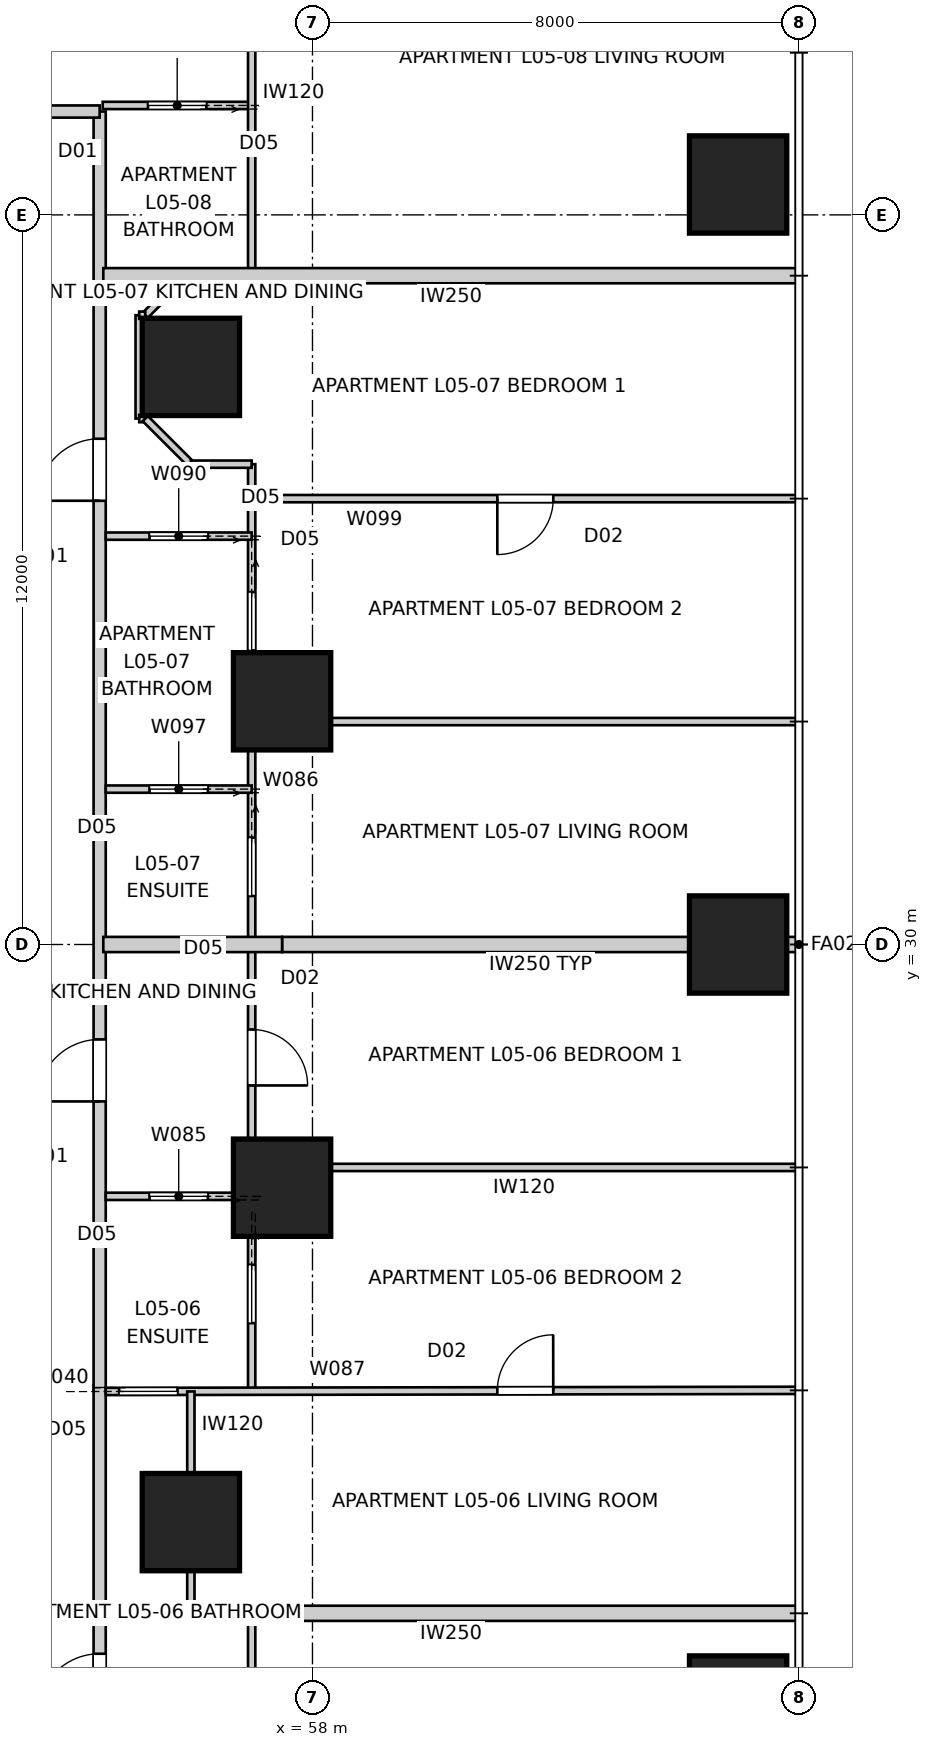
"""IFC4 building model, lengths in metres.
Left out: names, types, materials, properties, quantities, classifications, styles, units other than length and angle.
Written with IfcOpenShell. Run it as: python <this file> out.ifc"""

import sys

from ifc_helpers import new_model, si_unit, direction, frame, frame_2d, origin, origin_2d, place, context, subcontext, project, spatial, rectangle, extrude, element, fill, save


model = new_model("IFC4")
c1 = context("Model", 3, precision=1e-05, world=origin(), true_north=direction((0.0, 1.0)))
c2 = subcontext(c1, "Body", "Model", "MODEL_VIEW")
j1 = project(units=[si_unit("LENGTHUNIT", "METRE"), si_unit("PLANEANGLEUNIT", "RADIAN")], contexts=[c1])
p1 = place(None, origin())
s1 = spatial("IfcSite", under=j1, at=p1, CompositionType="ELEMENT")
p2 = place(p1, origin())
s2 = spatial("IfcBuilding", under=s1, at=p2, CompositionType="ELEMENT")
p3 = place(p2, frame((0.0, 0.0, 21.8)))
s3 = spatial("IfcBuildingStorey", under=s2, at=p3, CompositionType="ELEMENT", Elevation=21.8)
for number, where, z_axis, x_axis in (
    (1, (65.0, 17.5, 0.0), (0.0, 0.0, 1.0), (1.0, 0.0, 0.0)),
    (2, (65.0, 30.0, 0.0), (0.0, 0.0, 1.0), (1.0, 0.0, 0.0)),
    (3, (65.0, 42.5, 0.0), (0.0, 0.0, 1.0), (1.0, 0.0, 0.0)),
    (4, (57.5, 26.0, 0.0), (0.0, 0.0, 1.0), (1.0, 0.0, 0.0)),
    (5, (57.5, 34.0, 0.0), (0.0, 0.0, 1.0), (1.0, 0.0, 0.0)),
    (6, (56.0, 39.5, 0.0), (0.0, 0.0, 1.0), (1.0, 0.0, 0.0)),
    (7, (56.0, 20.5, 0.0), (0.0, 0.0, 1.0), (1.0, 0.0, 0.0)),
):
    element("IfcColumn", number, at=place(p3, frame(where, z_axis=z_axis, x_axis=x_axis)), inside=s3, PredefinedType="COLUMN", context=c2, shape_type="SweptSolid", body=[
        extrude(rectangle(XDim=1.6, YDim=1.6, at=origin_2d()), origin(), (0.0, 0.0, 1.0), 3.4),
    ])
p4 = place(p3, frame((54.5, 16.3, 0.0), z_axis=(0.0, 0.0, 1.0), x_axis=(0.0, 1.0, 0.0)))
e8 = element("IfcWall", 8, at=p4, inside=s3, PredefinedType="PARTITIONING", context=c2, shape_type="SweptSolid", body=[
    extrude(rectangle(XDim=27.4, YDim=0.2, at=frame_2d((13.7, 0.0))), origin(), (0.0, 0.0, 1.0), 3.25),
])
p5 = place(p4, frame((20.998, 0.0, 0.0)))
e9 = element("IfcOpeningElement", 9, at=p5, cuts=e8, PredefinedType="OPENING", context=c2, shape_type="SweptSolid", body=[
    extrude(rectangle(XDim=1.02, YDim=2.34, at=frame_2d((0.51, 1.17))), frame((0.0, 0.11, 0.0), z_axis=(0.0, -1.0, 0.0), x_axis=(1.0, 0.0, 0.0)), (0.0, 0.0, 1.0), 0.22),
])
p6 = place(p4, frame((11.119, 0.0, 0.0)))
e10 = element("IfcOpeningElement", 10, at=p6, cuts=e8, PredefinedType="OPENING", context=c2, shape_type="SweptSolid", body=[
    extrude(rectangle(XDim=1.02, YDim=2.34, at=frame_2d((0.51, 1.17))), frame((0.0, 0.11, 0.0), z_axis=(0.0, -1.0, 0.0), x_axis=(1.0, 0.0, 0.0)), (0.0, 0.0, 1.0), 0.22),
])
p7 = place(p4, frame((1.015, 0.0, 0.0)))
e11 = element("IfcOpeningElement", 11, at=p7, cuts=e8, PredefinedType="OPENING", context=c2, shape_type="SweptSolid", body=[
    extrude(rectangle(XDim=1.02, YDim=2.34, at=frame_2d((0.51, 1.17))), frame((0.0, 0.11, 0.0), z_axis=(0.0, -1.0, 0.0), x_axis=(1.0, 0.0, 0.0)), (0.0, 0.0, 1.0), 0.22),
])
p8 = place(p3, frame((54.5, 43.7, 0.0), z_axis=(0.0, 0.0, 1.0), x_axis=(-1.0, 0.0, 0.0)))
e12 = element("IfcWall", 12, at=p8, inside=s3, PredefinedType="PARTITIONING", context=c2, shape_type="SweptSolid", body=[
    extrude(rectangle(XDim=29.0, YDim=0.2, at=frame_2d((14.5, 0.0))), origin(), (0.0, 0.0, 1.0), 3.25),
])
p9 = place(p8, frame((22.253, 0.0, 0.0)))
e13 = element("IfcOpeningElement", 13, at=p9, cuts=e12, PredefinedType="OPENING", context=c2, shape_type="SweptSolid", body=[
    extrude(rectangle(XDim=1.02, YDim=2.34, at=frame_2d((0.51, 1.17))), frame((0.0, 0.11, 0.0), z_axis=(0.0, -1.0, 0.0), x_axis=(1.0, 0.0, 0.0)), (0.0, 0.0, 1.0), 0.22),
])
p10 = place(p8, frame((5.393, 0.0, 0.0)))
e14 = element("IfcOpeningElement", 14, at=p10, cuts=e12, PredefinedType="OPENING", context=c2, shape_type="SweptSolid", body=[
    extrude(rectangle(XDim=1.02, YDim=2.34, at=frame_2d((0.51, 1.17))), frame((0.0, 0.11, 0.0), z_axis=(0.0, -1.0, 0.0), x_axis=(1.0, 0.0, 0.0)), (0.0, 0.0, 1.0), 0.22),
])
p11 = place(p8, frame((1.281, 0.0, 0.0)))
e15 = element("IfcOpeningElement", 15, at=p11, cuts=e12, PredefinedType="OPENING", context=c2, shape_type="SweptSolid", body=[
    extrude(rectangle(XDim=1.02, YDim=2.34, at=frame_2d((0.51, 1.17))), frame((0.0, 0.11, 0.0), z_axis=(0.0, -1.0, 0.0), x_axis=(1.0, 0.0, 0.0)), (0.0, 0.0, 1.0), 0.22),
])
for number, where, z_axis, x_axis in (
    (16, (66.0, 19.0, 0.0), (0.0, 0.0, 1.0), (-1.0, 0.0, 0.0)),
    (17, (66.0, 41.0, 0.0), (0.0, 0.0, 1.0), (-1.0, 0.0, 0.0)),
):
    element("IfcWall", number, at=place(p3, frame(where, z_axis=z_axis, x_axis=x_axis)), inside=s3, PredefinedType="PARTITIONING", context=c2, shape_type="SweptSolid", body=[
        extrude(rectangle(XDim=11.44, YDim=0.25, at=frame_2d((5.72, 0.0))), origin(), (0.0, 0.0, 1.0), 3.25),
    ])
p12 = place(p3, frame((66.0, 30.0, 0.0), z_axis=(0.0, 0.0, 1.0), x_axis=(-1.0, 0.0, 0.0)))
e18 = element("IfcWall", 18, at=p12, inside=s3, PredefinedType="PARTITIONING", context=c2, shape_type="SweptSolid", body=[
    extrude(rectangle(XDim=8.5, YDim=0.25, at=frame_2d((4.25, 0.0))), origin(), (0.0, 0.0, 1.0), 3.25),
])
p13 = place(p3, frame((57.5, 30.0, 0.0), z_axis=(0.0, 0.0, 1.0), x_axis=(-1.0, 0.0, 0.0)))
e19 = element("IfcWall", 19, at=p13, inside=s3, PredefinedType="PARTITIONING", context=c2, shape_type="SweptSolid", body=[
    extrude(rectangle(XDim=2.94, YDim=0.25, at=frame_2d((1.47, 0.0))), origin(), (0.0, 0.0, 1.0), 2.796),
])
p14 = place(p3, frame((57.0, 19.0, 0.0), z_axis=(0.0, 0.0, 1.0), x_axis=(0.0, -1.0, 0.0)))
e20 = element("IfcWall", 20, at=p14, inside=s3, PredefinedType="PARTITIONING", context=c2, shape_type="SweptSolid", body=[
    extrude(rectangle(XDim=6.0, YDim=0.12, at=frame_2d((3.0, 0.0))), origin(), (0.0, 0.0, 1.0), 3.25),
])
p15 = place(p14, frame((2.54, 0.0, 0.0)))
e21 = element("IfcOpeningElement", 21, at=p15, cuts=e20, PredefinedType="OPENING", context=c2, shape_type="SweptSolid", body=[
    extrude(rectangle(XDim=0.92, YDim=2.34, at=frame_2d((0.46, 1.17))), frame((0.0, 0.07, 0.0), z_axis=(0.0, -1.0, 0.0), x_axis=(1.0, 0.0, 0.0)), (0.0, 0.0, 1.0), 0.14),
])
p16 = place(p3, frame((57.0, 25.858, 0.0), z_axis=(0.0, 0.0, 1.0), x_axis=(-1.0, 0.0, 0.0)))
e22 = element("IfcWall", 22, at=p16, inside=s3, PredefinedType="PARTITIONING", context=c2, shape_type="SweptSolid", body=[
    extrude(rectangle(XDim=2.4, YDim=0.12, at=frame_2d((1.2, 0.0))), origin(), (0.0, 0.0, 1.0), 3.25),
])
p17 = place(p16, frame((0.72, 0.0, 0.0)))
e23 = element("IfcOpeningElement", 23, at=p17, cuts=e22, PredefinedType="OPENING", context=c2, shape_type="SweptSolid", body=[
    extrude(rectangle(XDim=0.96, YDim=2.1, at=frame_2d((0.48, 1.05))), frame((0.0, 0.07, 0.0), z_axis=(0.0, -1.0, 0.0), x_axis=(1.0, 0.0, 0.0)), (0.0, 0.0, 1.0), 0.14),
])
p18 = place(p3, frame((57.0, 37.9, 0.0), z_axis=(0.0, 0.0, 1.0), x_axis=(0.0, -1.0, 0.0)))
e24 = element("IfcWall", 24, at=p18, inside=s3, PredefinedType="PARTITIONING", context=c2, shape_type="SweptSolid", body=[
    extrude(rectangle(XDim=15.251, YDim=0.12, at=frame_2d((7.625, 0.0))), origin(), (0.0, 0.0, 1.0), 2.549),
])
p19 = place(p18, frame((9.298, 0.0, 0.0)))
e25 = element("IfcOpeningElement", 25, at=p19, cuts=e24, PredefinedType="OPENING", context=c2, shape_type="SweptSolid", body=[
    extrude(rectangle(XDim=0.92, YDim=2.34, at=frame_2d((0.46, 1.17))), frame((0.0, 0.07, 0.0), z_axis=(0.0, -1.0, 0.0), x_axis=(1.0, 0.0, 0.0)), (0.0, 0.0, 1.0), 0.14),
])
p20 = place(p18, frame((2.104, 0.0, 0.0)))
e26 = element("IfcOpeningElement", 26, at=p20, cuts=e24, PredefinedType="OPENING", context=c2, shape_type="SweptSolid", body=[
    extrude(rectangle(XDim=0.96, YDim=2.1, at=frame_2d((0.48, 1.05))), frame((0.0, 0.07, 0.0), z_axis=(0.0, -1.0, 0.0), x_axis=(1.0, 0.0, 0.0)), (0.0, 0.0, 1.0), 0.14),
])
p21 = place(p18, frame((13.167, 0.0, 0.0)))
e27 = element("IfcOpeningElement", 27, at=p21, cuts=e24, PredefinedType="OPENING", context=c2, shape_type="SweptSolid", body=[
    extrude(rectangle(XDim=0.96, YDim=2.1, at=frame_2d((0.48, 1.05))), frame((0.0, 0.07, 0.0), z_axis=(0.0, -1.0, 0.0), x_axis=(1.0, 0.0, 0.0)), (0.0, 0.0, 1.0), 0.14),
])
p22 = place(p18, frame((6.142, 0.0, 0.0)))
e28 = element("IfcOpeningElement", 28, at=p22, cuts=e24, PredefinedType="OPENING", context=c2, shape_type="SweptSolid", body=[
    extrude(rectangle(XDim=0.96, YDim=2.1, at=frame_2d((0.48, 1.05))), frame((0.0, 0.07, 0.0), z_axis=(0.0, -1.0, 0.0), x_axis=(1.0, 0.0, 0.0)), (0.0, 0.0, 1.0), 0.14),
])
p23 = place(p3, frame((54.6, 22.649, 0.0), z_axis=(0.0, 0.0, 1.0), x_axis=(0.999998735361, 0.001590369792, 0.0)))
e29 = element("IfcWall", 29, at=p23, inside=s3, PredefinedType="PARTITIONING", context=c2, shape_type="SweptSolid", body=[
    extrude(rectangle(XDim=11.36, YDim=0.12, at=frame_2d((5.68, 0.0))), origin(), (0.0, 0.0, 1.0), 3.25),
])
p24 = place(p23, frame((0.22, 0.0, 0.0)))
e30 = element("IfcOpeningElement", 30, at=p24, cuts=e29, PredefinedType="OPENING", context=c2, shape_type="SweptSolid", body=[
    extrude(rectangle(XDim=0.96, YDim=2.1, at=frame_2d((0.48, 1.05))), frame((0.0, 0.07, 0.0), z_axis=(0.0, -1.0, 0.0), x_axis=(1.0, 0.0, 0.0)), (0.0, 0.0, 1.0), 0.14),
])
p25 = place(p23, frame((6.44, 0.0, 0.0)))
e31 = element("IfcOpeningElement", 31, at=p25, cuts=e29, PredefinedType="OPENING", context=c2, shape_type="SweptSolid", body=[
    extrude(rectangle(XDim=0.92, YDim=2.34, at=frame_2d((0.46, 1.17))), frame((0.0, 0.07, 0.0), z_axis=(0.0, -1.0, 0.0), x_axis=(1.0, 0.0, 0.0)), (0.0, 0.0, 1.0), 0.14),
])
p26 = place(p3, frame((56.0, 22.649, 0.0), z_axis=(0.0, 0.0, 1.0), x_axis=(0.0, -1.0, 0.0)))
e32 = element("IfcWall", 32, at=p26, inside=s3, PredefinedType="PARTITIONING", context=c2, shape_type="SweptSolid", body=[
    extrude(rectangle(XDim=3.649, YDim=0.12, at=frame_2d((1.824, 0.0))), origin(), (0.0, 0.0, 1.0), 2.549),
])
p27 = place(p3, frame((65.96, 26.333, 0.0), z_axis=(0.0, 0.0, 1.0), x_axis=(-1.0, 0.0, 0.0)))
e33 = element("IfcWall", 33, at=p27, inside=s3, PredefinedType="PARTITIONING", context=c2, shape_type="SweptSolid", body=[
    extrude(rectangle(XDim=8.96, YDim=0.12, at=frame_2d((4.48, 0.0))), origin(), (0.0, 0.0, 1.0), 3.25),
])
p28 = place(p3, frame((57.0, 36.716, 0.0), z_axis=(0.0, 0.0, 1.0), x_axis=(-1.0, 0.0, 0.0)))
e34 = element("IfcWall", 34, at=p28, inside=s3, PredefinedType="PARTITIONING", context=c2, shape_type="SweptSolid", body=[
    extrude(rectangle(XDim=2.4, YDim=0.12, at=frame_2d((1.2, 0.0))), origin(), (0.0, 0.0, 1.0), 3.25),
])
p29 = place(p28, frame((0.72, 0.0, 0.0)))
e35 = element("IfcOpeningElement", 35, at=p29, cuts=e34, PredefinedType="OPENING", context=c2, shape_type="SweptSolid", body=[
    extrude(rectangle(XDim=0.96, YDim=2.1, at=frame_2d((0.48, 1.05))), frame((0.0, 0.07, 0.0), z_axis=(0.0, -1.0, 0.0), x_axis=(1.0, 0.0, 0.0)), (0.0, 0.0, 1.0), 0.14),
])
p30 = place(p3, frame((55.9, 41.0, 0.0), z_axis=(0.0, 0.0, 1.0), x_axis=(-0.707106781187, -0.707106781187, 0.0)))
e36 = element("IfcWall", 36, at=p30, inside=s3, PredefinedType="PARTITIONING", context=c2, shape_type="SweptSolid", body=[
    extrude(rectangle(XDim=0.919, YDim=0.12, at=frame_2d((0.459, 0.0))), origin(), (0.0, 0.0, 1.0), 3.25),
])
p31 = place(p3, frame((55.15, 40.35, 0.0), z_axis=(0.0, 0.0, 1.0), x_axis=(0.0, -1.0, 0.0)))
e37 = element("IfcWall", 37, at=p31, inside=s3, PredefinedType="PARTITIONING", context=c2, shape_type="SweptSolid", body=[
    extrude(rectangle(XDim=1.7, YDim=0.12, at=frame_2d((0.85, 0.0))), origin(), (0.0, 0.0, 1.0), 3.25),
])
p32 = place(p3, frame((55.25, 38.65, 0.0), z_axis=(0.0, 0.0, 1.0), x_axis=(0.707106781187, -0.707106781187, 0.0)))
e38 = element("IfcWall", 38, at=p32, inside=s3, PredefinedType="PARTITIONING", context=c2, shape_type="SweptSolid", body=[
    extrude(rectangle(XDim=1.061, YDim=0.12, at=frame_2d((0.53, 0.0))), origin(), (0.0, 0.0, 1.0), 3.25),
])
p33 = place(p3, frame((56.0, 37.9, 0.0), z_axis=(0.0, 0.0, 1.0), x_axis=(1.0, 0.0, 0.0)))
e39 = element("IfcWall", 39, at=p33, inside=s3, PredefinedType="PARTITIONING", context=c2, shape_type="SweptSolid", body=[
    extrude(rectangle(XDim=1.0, YDim=0.12, at=frame_2d((0.5, 0.0))), origin(), (0.0, 0.0, 1.0), 3.25),
])
p34 = place(p3, frame((57.0, 32.555, 0.0), z_axis=(0.0, 0.0, 1.0), x_axis=(-1.0, 0.0, 0.0)))
e40 = element("IfcWall", 40, at=p34, inside=s3, PredefinedType="PARTITIONING", context=c2, shape_type="SweptSolid", body=[
    extrude(rectangle(XDim=2.4, YDim=0.12, at=frame_2d((1.2, 0.0))), origin(), (0.0, 0.0, 1.0), 3.25),
])
p35 = place(p34, frame((0.72, 0.0, 0.0)))
e41 = element("IfcOpeningElement", 41, at=p35, cuts=e40, PredefinedType="OPENING", context=c2, shape_type="SweptSolid", body=[
    extrude(rectangle(XDim=0.96, YDim=2.1, at=frame_2d((0.48, 1.05))), frame((0.0, 0.07, 0.0), z_axis=(0.0, -1.0, 0.0), x_axis=(1.0, 0.0, 0.0)), (0.0, 0.0, 1.0), 0.14),
])
p36 = place(p3, frame((57.0, 33.667, 0.0), z_axis=(0.0, 0.0, 1.0), x_axis=(1.0, 0.0, 0.0)))
e42 = element("IfcWall", 42, at=p36, inside=s3, PredefinedType="PARTITIONING", context=c2, shape_type="SweptSolid", body=[
    extrude(rectangle(XDim=8.96, YDim=0.12, at=frame_2d((4.48, 0.0))), origin(), (0.0, 0.0, 1.0), 3.25),
])
p37 = place(p3, frame((65.96, 37.333, 0.0), z_axis=(0.0, 0.0, 1.0), x_axis=(-1.0, 0.0, 0.0)))
e43 = element("IfcWall", 43, at=p37, inside=s3, PredefinedType="PARTITIONING", context=c2, shape_type="SweptSolid", body=[
    extrude(rectangle(XDim=8.96, YDim=0.12, at=frame_2d((4.48, 0.0))), origin(), (0.0, 0.0, 1.0), 3.25),
])
p38 = place(p37, frame((4.0, 0.0, 0.0)))
e44 = element("IfcOpeningElement", 44, at=p38, cuts=e43, PredefinedType="OPENING", context=c2, shape_type="SweptSolid", body=[
    extrude(rectangle(XDim=0.92, YDim=2.34, at=frame_2d((0.46, 1.17))), frame((0.0, 0.07, 0.0), z_axis=(0.0, -1.0, 0.0), x_axis=(1.0, 0.0, 0.0)), (0.0, 0.0, 1.0), 0.14),
])
p39 = place(p3, frame((57.0, 43.8, 0.0), z_axis=(0.0, 0.0, 1.0), x_axis=(-1.0, 0.0, 0.0)))
e45 = element("IfcWall", 45, at=p39, inside=s3, PredefinedType="PARTITIONING", context=c2, shape_type="SweptSolid", body=[
    extrude(rectangle(XDim=2.45, YDim=0.12, at=frame_2d((1.225, 0.0))), origin(), (0.0, 0.0, 1.0), 3.25),
])
p40 = place(p39, frame((0.745, 0.0, 0.0)))
e46 = element("IfcOpeningElement", 46, at=p40, cuts=e45, PredefinedType="OPENING", context=c2, shape_type="SweptSolid", body=[
    extrude(rectangle(XDim=0.96, YDim=2.1, at=frame_2d((0.48, 1.05))), frame((0.0, 0.07, 0.0), z_axis=(0.0, -1.0, 0.0), x_axis=(1.0, 0.0, 0.0)), (0.0, 0.0, 1.0), 0.14),
])
p41 = place(p3, frame((57.0, 47.0, 0.0), z_axis=(0.0, 0.0, 1.0), x_axis=(0.0, -1.0, 0.0)))
e47 = element("IfcWall", 47, at=p41, inside=s3, PredefinedType="PARTITIONING", context=c2, shape_type="SweptSolid", body=[
    extrude(rectangle(XDim=6.0, YDim=0.12, at=frame_2d((3.0, 0.0))), origin(), (0.0, 0.0, 1.0), 3.25),
])
for number, where, z_axis, x_axis in (
    (48, (55.15, 40.35, 0.0), (0.0, 0.0, 1.0), (1.0, 0.0, 0.0)),
    (49, (55.15, 38.65, 0.0), (0.0, 0.0, 1.0), (1.0, 0.0, 0.0)),
):
    element("IfcWall", number, at=place(p3, frame(where, z_axis=z_axis, x_axis=x_axis)), inside=s3, PredefinedType="PARTITIONING", context=c2, shape_type="SweptSolid", body=[
        extrude(rectangle(XDim=0.1, YDim=0.12, at=frame_2d((0.05, 0.0))), origin(), (0.0, 0.0, 1.0), 3.25),
    ])
p42 = place(p5, origin())
e50 = element("IfcDoor", 50, at=p42, inside=s3, OperationType="SINGLE_SWING_LEFT", PredefinedType="DOOR", context=c2, shape_type="SweptSolid", body=[
    extrude(rectangle(XDim=1.02, YDim=2.34, at=frame_2d((0.51, 1.17))), frame((0.0, 0.025, 0.0), z_axis=(0.0, -1.0, 0.0), x_axis=(1.0, 0.0, 0.0)), (0.0, 0.0, 1.0), 0.05),
])
fill(e9, e50)
p43 = place(p6, origin())
e51 = element("IfcDoor", 51, at=p43, inside=s3, OperationType="SINGLE_SWING_LEFT", PredefinedType="DOOR", context=c2, shape_type="SweptSolid", body=[
    extrude(rectangle(XDim=1.02, YDim=2.34, at=frame_2d((0.51, 1.17))), frame((0.0, 0.025, 0.0), z_axis=(0.0, -1.0, 0.0), x_axis=(1.0, 0.0, 0.0)), (0.0, 0.0, 1.0), 0.05),
])
fill(e10, e51)
p44 = place(p7, origin())
e52 = element("IfcDoor", 52, at=p44, inside=s3, OperationType="SINGLE_SWING_LEFT", PredefinedType="DOOR", context=c2, shape_type="SweptSolid", body=[
    extrude(rectangle(XDim=1.02, YDim=2.34, at=frame_2d((0.51, 1.17))), frame((0.0, 0.025, 0.0), z_axis=(0.0, -1.0, 0.0), x_axis=(1.0, 0.0, 0.0)), (0.0, 0.0, 1.0), 0.05),
])
fill(e11, e52)
p45 = place(p29, origin())
e53 = element("IfcDoor", 53, at=p45, inside=s3, OperationType="SLIDING_TO_LEFT", PredefinedType="DOOR", context=c2, shape_type="SweptSolid", body=[
    extrude(rectangle(XDim=0.96, YDim=2.1, at=frame_2d((0.48, 1.05))), frame((0.0, 0.025, 0.0), z_axis=(0.0, -1.0, 0.0), x_axis=(1.0, 0.0, 0.0)), (0.0, 0.0, 1.0), 0.05),
])
fill(e35, e53)
p46 = place(p19, origin())
e54 = element("IfcDoor", 54, at=p46, inside=s3, OperationType="SINGLE_SWING_RIGHT", PredefinedType="DOOR", context=c2, shape_type="SweptSolid", body=[
    extrude(rectangle(XDim=0.92, YDim=2.34, at=frame_2d((0.46, 1.17))), frame((0.0, 0.025, 0.0), z_axis=(0.0, -1.0, 0.0), x_axis=(1.0, 0.0, 0.0)), (0.0, 0.0, 1.0), 0.05),
])
fill(e25, e54)
p47 = place(p17, origin())
e55 = element("IfcDoor", 55, at=p47, inside=s3, OperationType="SLIDING_TO_LEFT", PredefinedType="DOOR", context=c2, shape_type="SweptSolid", body=[
    extrude(rectangle(XDim=0.96, YDim=2.1, at=frame_2d((0.48, 1.05))), frame((0.0, 0.025, 0.0), z_axis=(0.0, -1.0, 0.0), x_axis=(1.0, 0.0, 0.0)), (0.0, 0.0, 1.0), 0.05),
])
fill(e23, e55)
p48 = place(p40, origin())
e56 = element("IfcDoor", 56, at=p48, inside=s3, OperationType="SLIDING_TO_LEFT", PredefinedType="DOOR", context=c2, shape_type="SweptSolid", body=[
    extrude(rectangle(XDim=0.96, YDim=2.1, at=frame_2d((0.48, 1.05))), frame((0.0, 0.025, 0.0), z_axis=(0.0, -1.0, 0.0), x_axis=(1.0, 0.0, 0.0)), (0.0, 0.0, 1.0), 0.05),
])
fill(e46, e56)
p49 = place(p20, origin())
e57 = element("IfcDoor", 57, at=p49, inside=s3, OperationType="SLIDING_TO_LEFT", PredefinedType="DOOR", context=c2, shape_type="SweptSolid", body=[
    extrude(rectangle(XDim=0.96, YDim=2.1, at=frame_2d((0.48, 1.05))), frame((0.0, 0.025, 0.0), z_axis=(0.0, -1.0, 0.0), x_axis=(1.0, 0.0, 0.0)), (0.0, 0.0, 1.0), 0.05),
])
fill(e26, e57)
p50 = place(p35, origin())
e58 = element("IfcDoor", 58, at=p50, inside=s3, OperationType="SLIDING_TO_LEFT", PredefinedType="DOOR", context=c2, shape_type="SweptSolid", body=[
    extrude(rectangle(XDim=0.96, YDim=2.1, at=frame_2d((0.48, 1.05))), frame((0.0, 0.025, 0.0), z_axis=(0.0, -1.0, 0.0), x_axis=(1.0, 0.0, 0.0)), (0.0, 0.0, 1.0), 0.05),
])
fill(e41, e58)
p51 = place(p21, origin())
e59 = element("IfcDoor", 59, at=p51, inside=s3, OperationType="SLIDING_TO_LEFT", PredefinedType="DOOR", context=c2, shape_type="SweptSolid", body=[
    extrude(rectangle(XDim=0.96, YDim=2.1, at=frame_2d((0.48, 1.05))), frame((0.0, 0.025, 0.0), z_axis=(0.0, -1.0, 0.0), x_axis=(1.0, 0.0, 0.0)), (0.0, 0.0, 1.0), 0.05),
])
fill(e27, e59)
p52 = place(p24, origin())
e60 = element("IfcDoor", 60, at=p52, inside=s3, OperationType="SLIDING_TO_LEFT", PredefinedType="DOOR", context=c2, shape_type="SweptSolid", body=[
    extrude(rectangle(XDim=0.96, YDim=2.1, at=frame_2d((0.48, 1.05))), frame((0.0, 0.025, 0.0), z_axis=(0.0, -1.0, 0.0), x_axis=(1.0, 0.0, 0.0)), (0.0, 0.0, 1.0), 0.05),
])
fill(e30, e60)
p53 = place(p22, origin())
e61 = element("IfcDoor", 61, at=p53, inside=s3, OperationType="SLIDING_TO_LEFT", PredefinedType="DOOR", context=c2, shape_type="SweptSolid", body=[
    extrude(rectangle(XDim=0.96, YDim=2.1, at=frame_2d((0.48, 1.05))), frame((0.0, 0.025, 0.0), z_axis=(0.0, -1.0, 0.0), x_axis=(1.0, 0.0, 0.0)), (0.0, 0.0, 1.0), 0.05),
])
fill(e28, e61)
p54 = place(p38, origin())
e62 = element("IfcDoor", 62, at=p54, inside=s3, OperationType="SINGLE_SWING_RIGHT", PredefinedType="DOOR", context=c2, shape_type="SweptSolid", body=[
    extrude(rectangle(XDim=0.92, YDim=2.34, at=frame_2d((0.46, 1.17))), frame((0.0, 0.025, 0.0), z_axis=(0.0, -1.0, 0.0), x_axis=(1.0, 0.0, 0.0)), (0.0, 0.0, 1.0), 0.05),
])
fill(e44, e62)
p55 = place(p25, origin())
e63 = element("IfcDoor", 63, at=p55, inside=s3, OperationType="SINGLE_SWING_RIGHT", PredefinedType="DOOR", context=c2, shape_type="SweptSolid", body=[
    extrude(rectangle(XDim=0.92, YDim=2.34, at=frame_2d((0.46, 1.17))), frame((0.0, 0.025, 0.0), z_axis=(0.0, -1.0, 0.0), x_axis=(1.0, 0.0, 0.0)), (0.0, 0.0, 1.0), 0.05),
])
fill(e31, e63)
save(model, sys.argv[1])
